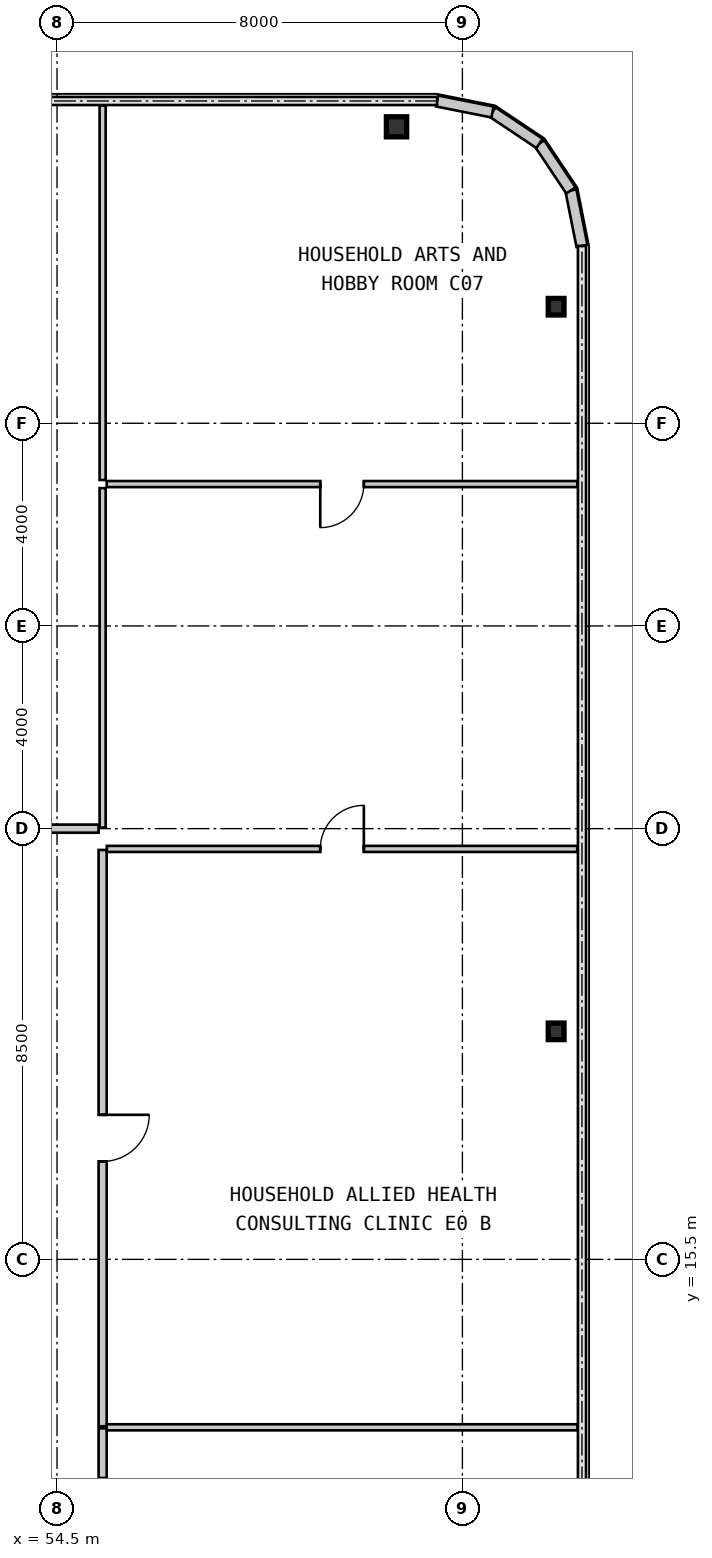
"""IFC4 building model, lengths in metres.
Left out: names, types, materials, properties, quantities, classifications, styles, units other than length and angle.
Written with IfcOpenShell. Run it as: python <this file> out.ifc"""

import sys

from ifc_helpers import new_model, si_unit, direction, frame, frame_2d, origin, origin_2d, place, context, subcontext, project, spatial, rectangle, i_section, extrude, source, transform, mapped, element, fill, save


model = new_model("IFC4")
c1 = context("Model", 3, precision=1e-05, world=origin(), true_north=direction((0.0, 1.0)))
c2 = subcontext(c1, "Body", "Model", "MODEL_VIEW")
j1 = project(units=[si_unit("LENGTHUNIT", "METRE"), si_unit("PLANEANGLEUNIT", "RADIAN")], contexts=[c1])
p1 = place(None, origin())
s1 = spatial("IfcSite", under=j1, at=p1, CompositionType="ELEMENT")
p2 = place(p1, origin())
s2 = spatial("IfcBuilding", under=s1, at=p2, CompositionType="ELEMENT")
p3 = place(p2, frame((0.0, 0.0, 57.75)))
s3 = spatial("IfcBuildingStorey", under=s2, at=p3, CompositionType="ELEMENT", Elevation=57.75)
m1 = source(origin(), c2, "Body", "SweptSolid", [
    extrude(i_section(OverallWidth=0.4, OverallDepth=0.396, WebThickness=0.022, FlangeThickness=0.034, at=origin_2d()), origin(), (0.0, 0.0, 1.0), 3.15),
])
p4 = place(p3, frame((61.2, 37.85, 0.0), z_axis=(0.0, 0.0, 1.0), x_axis=(1.0, 0.0, 0.0)))
e1 = element("IfcColumn", 1, at=p4, inside=s3, PredefinedType="COLUMN", context=c2, shape_type="MappedRepresentation", body=[
    mapped(m1, transform((0.0, 0.0, 0.0), scale=1.0)),
])
m2 = source(origin(), c2, "Body", "SweptSolid", [
    extrude(i_section(OverallWidth=0.311, OverallDepth=0.327, WebThickness=0.016, FlangeThickness=0.025, at=origin_2d()), origin(), (0.0, 0.0, 1.0), 3.15),
])
for number, where, z_axis, x_axis in (
    (2, (64.35, 20.0, 0.0), (0.0, 0.0, 1.0), (1.0, 0.0, 0.0)),
    (3, (64.35, 34.3, 0.0), (0.0, 0.0, 1.0), (1.0, 0.0, 0.0)),
):
    element("IfcColumn", number, at=place(p3, frame(where, z_axis=z_axis, x_axis=x_axis)), inside=s3, PredefinedType="COLUMN", context=c2, shape_type="MappedRepresentation", body=[
        mapped(m2, transform((0.0, 0.0, 0.0), scale=1.0)),
    ])
m3 = source(origin(), c2, "Body", "SweptSolid", [
    extrude(rectangle(XDim=1.116, YDim=0.22, at=frame_2d((0.558, 0.0))), origin(), (0.0, 0.0, 1.0), 2.87),
])
for number, where, z_axis, x_axis in (
    (4, (64.86, 35.5, 0.0), (0.0, 0.0, 1.0), (-0.195, 0.981, 0.0)),
    (5, (64.642, 36.594, 0.0), (0.0, 0.0, 1.0), (-0.556, 0.831, 0.0)),
    (6, (64.022, 37.522, 0.0), (0.0, 0.0, 1.0), (-0.831, 0.556, 0.0)),
    (7, (63.094, 38.142, 0.0), (0.0, 0.0, 1.0), (-0.981, 0.195, 0.0)),
):
    element("IfcWall", number, at=place(p3, frame(where, z_axis=z_axis, x_axis=x_axis)), inside=s3, PredefinedType="SOLIDWALL", context=c2, shape_type="MappedRepresentation", body=[
        mapped(m3, transform((0.0, 0.0, 0.0), scale=1.0)),
    ])
m4 = source(origin(), c2, "Body", "SweptSolid", [
    extrude(rectangle(XDim=2.886, YDim=0.16, at=frame_2d((1.443, 0.0))), origin(), (0.0, 0.0, 1.0), 2.87),
])
p5 = place(p3, frame((55.4, 12.166, 0.0), z_axis=(0.0, 0.0, 1.0), x_axis=(0.0, -1.0, 0.0)))
e8 = element("IfcWall", 8, at=p5, inside=s3, PredefinedType="PARTITIONING", context=c2, shape_type="MappedRepresentation", body=[
    mapped(m4, transform((0.0, 0.0, 0.0), scale=1.0)),
])
m5 = source(origin(), c2, "Body", "SweptSolid", [
    extrude(rectangle(XDim=0.92, YDim=2.1, at=frame_2d((0.46, 1.05))), frame((0.0, 0.09, 0.0), z_axis=(0.0, -1.0, 0.0), x_axis=(1.0, 0.0, 0.0)), (0.0, 0.0, 1.0), 0.18),
])
p6 = place(p5, frame((0.983, 0.0, 0.0)))
e9 = element("IfcOpeningElement", 9, at=p6, cuts=e8, PredefinedType="OPENING", context=c2, shape_type="MappedRepresentation", body=[
    mapped(m5, transform((0.0, 0.0, 0.0), scale=1.0)),
])
m6 = source(origin(), c2, "Body", "SweptSolid", [
    extrude(rectangle(XDim=11.373, YDim=0.16, at=frame_2d((5.687, 0.0))), origin(), (0.0, 0.0, 1.0), 2.87),
])
p7 = place(p3, frame((55.4, 23.579, 0.0), z_axis=(0.0, 0.0, 1.0), x_axis=(0.0, -1.0, 0.0)))
e10 = element("IfcWall", 10, at=p7, inside=s3, PredefinedType="PARTITIONING", context=c2, shape_type="MappedRepresentation", body=[
    mapped(m6, transform((0.0, 0.0, 0.0), scale=1.0)),
])
p8 = place(p7, frame((5.227, 0.0, 0.0)))
e11 = element("IfcOpeningElement", 11, at=p8, cuts=e10, PredefinedType="OPENING", context=c2, shape_type="MappedRepresentation", body=[
    mapped(m5, transform((0.0, 0.0, 0.0), scale=1.0)),
])
m7 = source(origin(), c2, "Body", "SweptSolid", [
    extrude(rectangle(XDim=4.13, YDim=0.16, at=frame_2d((2.065, 0.0))), origin(), (0.0, 0.0, 1.0), 2.87),
])
p9 = place(p3, frame((51.19, 24.0, 0.0), z_axis=(0.0, 0.0, 1.0), x_axis=(1.0, 0.0, 0.0)))
e12 = element("IfcWall", 12, at=p9, inside=s3, PredefinedType="PARTITIONING", context=c2, shape_type="MappedRepresentation", body=[
    mapped(m7, transform((0.0, 0.0, 0.0), scale=1.0)),
])
m8 = source(origin(), c2, "Body", "SweptSolid", [
    extrude(rectangle(XDim=9.29, YDim=0.12, at=frame_2d((4.645, 0.0))), origin(), (0.0, 0.0, 1.0), 2.87),
])
p10 = place(p3, frame((55.48, 12.186, 0.0), z_axis=(0.0, 0.0, 1.0), x_axis=(1.0, 0.0, 0.0)))
e13 = element("IfcWall", 13, at=p10, inside=s3, PredefinedType="PARTITIONING", context=c2, shape_type="MappedRepresentation", body=[
    mapped(m8, transform((0.0, 0.0, 0.0), scale=1.0)),
])
m9 = source(origin(), c2, "Body", "SweptSolid", [
    extrude(rectangle(XDim=9.284, YDim=0.12, at=frame_2d((4.642, 0.0))), origin(), (0.0, 0.0, 1.0), 2.87),
])
p11 = place(p3, frame((55.483, 23.6, 0.0), z_axis=(0.0, 0.0, 1.0), x_axis=(1.0, 0.0, 0.0)))
e14 = element("IfcWall", 14, at=p11, inside=s3, PredefinedType="PARTITIONING", context=c2, shape_type="MappedRepresentation", body=[
    mapped(m9, transform((0.0, 0.0, 0.0), scale=1.0)),
])
m10 = source(origin(), c2, "Body", "SweptSolid", [
    extrude(rectangle(XDim=0.86, YDim=2.1, at=frame_2d((0.43, 1.05))), frame((0.0, 0.07, 0.0), z_axis=(0.0, -1.0, 0.0), x_axis=(1.0, 0.0, 0.0)), (0.0, 0.0, 1.0), 0.14),
])
p12 = place(p11, frame((4.212, 0.0, 0.0)))
e15 = element("IfcOpeningElement", 15, at=p12, cuts=e14, PredefinedType="OPENING", context=c2, shape_type="MappedRepresentation", body=[
    mapped(m10, transform((0.0, 0.0, 0.0), scale=1.0)),
])
p13 = place(p3, frame((55.48, 30.8, 0.0), z_axis=(0.0, 0.0, 1.0), x_axis=(1.0, 0.0, 0.0)))
e16 = element("IfcWall", 16, at=p13, inside=s3, PredefinedType="PARTITIONING", context=c2, shape_type="MappedRepresentation", body=[
    mapped(m8, transform((0.0, 0.0, 0.0), scale=1.0)),
])
p14 = place(p13, frame((4.215, 0.0, 0.0)))
e17 = element("IfcOpeningElement", 17, at=p14, cuts=e16, PredefinedType="OPENING", context=c2, shape_type="MappedRepresentation", body=[
    mapped(m10, transform((0.0, 0.0, 0.0), scale=1.0)),
])
m11 = source(origin(), c2, "Body", "SweptSolid", [
    extrude(rectangle(XDim=6.7, YDim=0.12, at=frame_2d((3.35, 0.0))), origin(), (0.0, 0.0, 1.0), 2.87),
])
p15 = place(p3, frame((55.4, 24.02, 0.0), z_axis=(0.0, 0.0, 1.0), x_axis=(0.0, 1.0, 0.0)))
e18 = element("IfcWall", 18, at=p15, inside=s3, PredefinedType="PARTITIONING", context=c2, shape_type="MappedRepresentation", body=[
    mapped(m11, transform((0.0, 0.0, 0.0), scale=1.0)),
])
m12 = source(origin(), c2, "Body", "SweptSolid", [
    extrude(rectangle(XDim=7.39, YDim=0.12, at=frame_2d((3.695, 0.0))), origin(), (0.0, 0.0, 1.0), 2.87),
])
p16 = place(p3, frame((55.4, 30.88, 0.0), z_axis=(0.0, 0.0, 1.0), x_axis=(0.0, 1.0, 0.0)))
e19 = element("IfcWall", 19, at=p16, inside=s3, PredefinedType="PARTITIONING", context=c2, shape_type="MappedRepresentation", body=[
    mapped(m12, transform((0.0, 0.0, 0.0), scale=1.0)),
])
m13 = source(origin(), c2, "Body", "SweptSolid", [
    extrude(rectangle(XDim=0.92, YDim=2.1, at=frame_2d((0.46, 1.05))), frame((0.0, 0.025, 0.0), z_axis=(0.0, -1.0, 0.0), x_axis=(1.0, 0.0, 0.0)), (0.0, 0.0, 1.0), 0.05),
])
p17 = place(p8, origin())
e20 = element("IfcDoor", 20, at=p17, inside=s3, OperationType="SINGLE_SWING_LEFT", PredefinedType="DOOR", context=c2, shape_type="MappedRepresentation", body=[
    mapped(m13, transform((0.0, 0.0, 0.0), scale=1.0)),
])
fill(e11, e20)
m14 = source(origin(), c2, "Body", "SweptSolid", [
    extrude(rectangle(XDim=0.86, YDim=2.1, at=frame_2d((0.43, 1.05))), frame((0.0, 0.025, 0.0), z_axis=(0.0, -1.0, 0.0), x_axis=(1.0, 0.0, 0.0)), (0.0, 0.0, 1.0), 0.05),
])
p18 = place(p12, origin())
e21 = element("IfcDoor", 21, at=p18, inside=s3, OperationType="SINGLE_SWING_RIGHT", PredefinedType="DOOR", context=c2, shape_type="MappedRepresentation", body=[
    mapped(m14, transform((0.0, 0.0, 0.0), scale=1.0)),
])
fill(e15, e21)
p19 = place(p14, frame((0.86, 0.0, 0.0), z_axis=(0.0, 0.0, 1.0), x_axis=(-1.0, 0.0, 0.0)))
e22 = element("IfcDoor", 22, at=p19, inside=s3, OperationType="SINGLE_SWING_RIGHT", PredefinedType="DOOR", context=c2, shape_type="MappedRepresentation", body=[
    mapped(m14, transform((0.0, 0.0, 0.0), scale=1.0)),
])
fill(e17, e22)
save(model, sys.argv[1])
